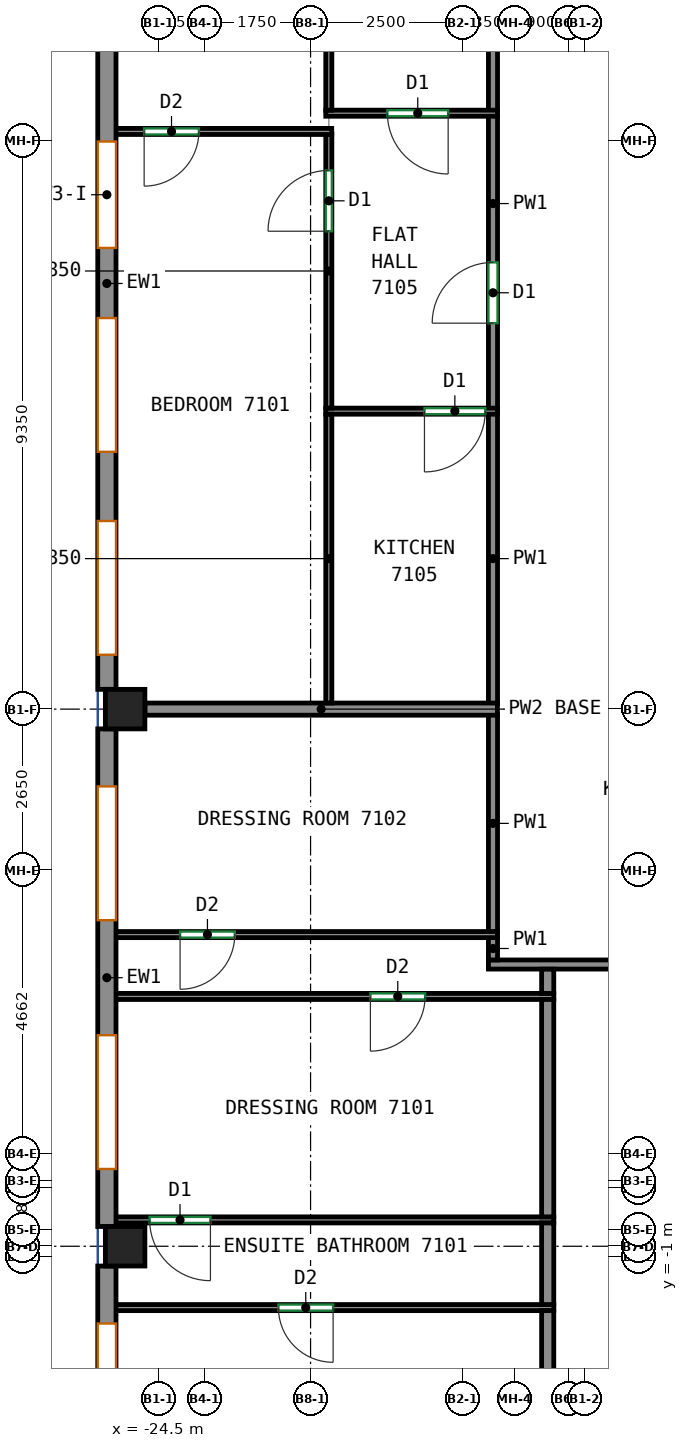
"""IFC4 building model, lengths in metres.
Left out: names, types, materials, properties, quantities, classifications, styles, units other than length and angle.
Written with IfcOpenShell. Run it as: python <this file> out.ifc"""

import sys

from ifc_helpers import new_model, si_unit, direction, frame, frame_2d, origin, origin_2d, place, context, subcontext, project, spatial, rectangle, extrude, source, transform, mapped, element, fill, save


model = new_model("IFC4")
c1 = context("Model", 3, precision=1e-05, world=origin(), true_north=direction((0.0, 1.0)))
c2 = subcontext(c1, "Body", "Model", "MODEL_VIEW")
j1 = project(units=[si_unit("LENGTHUNIT", "METRE"), si_unit("PLANEANGLEUNIT", "RADIAN")], contexts=[c1])
p1 = place(None, origin())
s1 = spatial("IfcSite", under=j1, at=p1, CompositionType="ELEMENT")
p2 = place(p1, origin())
s2 = spatial("IfcBuilding", under=s1, at=p2, CompositionType="ELEMENT")
p3 = place(p2, frame((0.0, 0.0, 287.4)))
s3 = spatial("IfcBuildingStorey", under=s2, at=p3, CompositionType="ELEMENT", Elevation=287.4)
m1 = source(origin(), c2, "Body", "SweptSolid", [
    extrude(rectangle(XDim=0.65, YDim=0.65, at=origin_2d()), origin(), (0.0, 0.0, 1.0), 3.0),
])
for number, where, z_axis, x_axis in (
    (1, (-25.05, -0.833, 0.0), (0.0, 0.0, 1.0), (1.0, 0.0, 0.0)),
    (2, (-25.05, 8.0, 0.0), (0.0, 0.0, 1.0), (1.0, 0.0, 0.0)),
):
    element("IfcColumn", number, at=place(p3, frame(where, z_axis=z_axis, x_axis=x_axis)), inside=s3, PredefinedType="COLUMN", context=c2, shape_type="MappedRepresentation", body=[
        mapped(m1, transform((0.0, 0.0, 0.0))),
    ])
m2 = source(origin(), c2, "Body", "SweptSolid", [
    extrude(rectangle(XDim=13.35, YDim=0.3, at=frame_2d((6.675, 0.0))), origin(), (0.0, 0.0, 1.0), 3.0),
])
p4 = place(p3, frame((-25.35, 21.675, 0.0), z_axis=(0.0, 0.0, 1.0), x_axis=(0.0, -1.0, 0.0)))
e3 = element("IfcWall", 3, at=p4, inside=s3, PredefinedType="SOLIDWALL", context=c2, shape_type="MappedRepresentation", body=[
    mapped(m2, transform((0.0, 0.0, 0.0))),
])
p5 = place(p4, frame((0.569, 0.0, 0.8)))
e4 = element("IfcOpeningElement", 4, at=p5, cuts=e3, PredefinedType="OPENING", context=c2, shape_type="SweptSolid", body=[
    extrude(rectangle(XDim=2.2, YDim=2.05, at=frame_2d((1.1, 1.025))), frame((0.0, 0.16, 0.0), z_axis=(0.0, -1.0, 0.0), x_axis=(1.0, 0.0, 0.0)), (0.0, 0.0, 1.0), 0.32),
])
p6 = place(p4, frame((4.341, 0.0, 0.8)))
e5 = element("IfcOpeningElement", 5, at=p6, cuts=e3, PredefinedType="OPENING", context=c2, shape_type="SweptSolid", body=[
    extrude(rectangle(XDim=1.75, YDim=2.05, at=frame_2d((0.875, 1.025))), frame((0.0, 0.16, 0.0), z_axis=(0.0, -1.0, 0.0), x_axis=(1.0, 0.0, 0.0)), (0.0, 0.0, 1.0), 0.32),
])
p7 = place(p4, frame((7.244, 0.0, 0.8)))
e6 = element("IfcOpeningElement", 6, at=p7, cuts=e3, PredefinedType="OPENING", context=c2, shape_type="SweptSolid", body=[
    extrude(rectangle(XDim=2.2, YDim=2.05, at=frame_2d((1.1, 1.025))), frame((0.0, 0.16, 0.0), z_axis=(0.0, -1.0, 0.0), x_axis=(1.0, 0.0, 0.0)), (0.0, 0.0, 1.0), 0.32),
])
p8 = place(p4, frame((10.581, 0.0, 0.8)))
e7 = element("IfcOpeningElement", 7, at=p8, cuts=e3, PredefinedType="OPENING", context=c2, shape_type="SweptSolid", body=[
    extrude(rectangle(XDim=2.2, YDim=2.05, at=frame_2d((1.1, 1.025))), frame((0.0, 0.16, 0.0), z_axis=(0.0, -1.0, 0.0), x_axis=(1.0, 0.0, 0.0)), (0.0, 0.0, 1.0), 0.32),
])
m3 = source(origin(), c2, "Body", "SweptSolid", [
    extrude(rectangle(XDim=8.183, YDim=0.3, at=frame_2d((4.092, 0.0))), origin(), (0.0, 0.0, 1.0), 3.0),
])
p9 = place(p3, frame((-25.35, 7.675, 0.0), z_axis=(0.0, 0.0, 1.0), x_axis=(0.0, -1.0, 0.0)))
e8 = element("IfcWall", 8, at=p9, inside=s3, PredefinedType="SOLIDWALL", context=c2, shape_type="MappedRepresentation", body=[
    mapped(m3, transform((0.0, 0.0, 0.0))),
])
p10 = place(p9, frame((0.946, 0.0, 0.8)))
e9 = element("IfcOpeningElement", 9, at=p10, cuts=e8, PredefinedType="OPENING", context=c2, shape_type="SweptSolid", body=[
    extrude(rectangle(XDim=2.2, YDim=2.05, at=frame_2d((1.1, 1.025))), frame((0.0, 0.16, 0.0), z_axis=(0.0, -1.0, 0.0), x_axis=(1.0, 0.0, 0.0)), (0.0, 0.0, 1.0), 0.32),
])
p11 = place(p9, frame((5.037, 0.0, 0.8)))
e10 = element("IfcOpeningElement", 10, at=p11, cuts=e8, PredefinedType="OPENING", context=c2, shape_type="SweptSolid", body=[
    extrude(rectangle(XDim=2.2, YDim=2.05, at=frame_2d((1.1, 1.025))), frame((0.0, 0.16, 0.0), z_axis=(0.0, -1.0, 0.0), x_axis=(1.0, 0.0, 0.0)), (0.0, 0.0, 1.0), 0.32),
])
m4 = source(origin(), c2, "Body", "SweptSolid", [
    extrude(rectangle(XDim=8.184, YDim=0.3, at=frame_2d((4.092, 0.0))), origin(), (0.0, 0.0, 1.0), 3.0),
])
p12 = place(p3, frame((-25.35, -1.158, 0.0), z_axis=(0.0, 0.0, 1.0), x_axis=(0.0, -1.0, 0.0)))
e11 = element("IfcWall", 11, at=p12, inside=s3, PredefinedType="SOLIDWALL", context=c2, shape_type="MappedRepresentation", body=[
    mapped(m4, transform((0.0, 0.0, 0.0))),
])
p13 = place(p12, frame((0.946, 0.0, 0.8)))
e12 = element("IfcOpeningElement", 12, at=p13, cuts=e11, PredefinedType="OPENING", context=c2, shape_type="SweptSolid", body=[
    extrude(rectangle(XDim=2.2, YDim=2.05, at=frame_2d((1.1, 1.025))), frame((0.0, 0.16, 0.0), z_axis=(0.0, -1.0, 0.0), x_axis=(1.0, 0.0, 0.0)), (0.0, 0.0, 1.0), 0.32),
])
p14 = place(p12, frame((5.038, 0.0, 0.8)))
e13 = element("IfcOpeningElement", 13, at=p14, cuts=e11, PredefinedType="OPENING", context=c2, shape_type="SweptSolid", body=[
    extrude(rectangle(XDim=2.2, YDim=2.05, at=frame_2d((1.1, 1.025))), frame((0.0, 0.16, 0.0), z_axis=(0.0, -1.0, 0.0), x_axis=(1.0, 0.0, 0.0)), (0.0, 0.0, 1.0), 0.32),
])
p15 = place(p3, frame((-19.075, 3.8, 0.0), z_axis=(0.0, 0.0, 1.0), x_axis=(1.0, 0.0, 0.0)))
e14 = element("IfcWall", 14, at=p15, inside=s3, PredefinedType="PARTITIONING", context=c2, shape_type="SweptSolid", body=[
    extrude(rectangle(XDim=4.89, YDim=0.15, at=frame_2d((2.445, 0.0))), origin(), (0.0, 0.0, 1.0), 3.0),
])
p16 = place(p3, frame((-19.0, 3.875, 0.0), z_axis=(0.0, 0.0, 1.0), x_axis=(0.0, 1.0, 0.0)))
e15 = element("IfcWall", 15, at=p16, inside=s3, PredefinedType="PARTITIONING", context=c2, shape_type="SweptSolid", body=[
    extrude(rectangle(XDim=0.377, YDim=0.15, at=frame_2d((0.188, 0.0))), origin(), (0.0, 0.0, 1.0), 3.0),
])
p17 = place(p3, frame((-19.0, 4.332, 0.0), z_axis=(0.0, 0.0, 1.0), x_axis=(0.0, 1.0, 0.0)))
e16 = element("IfcWall", 16, at=p17, inside=s3, PredefinedType="PARTITIONING", context=c2, shape_type="SweptSolid", body=[
    extrude(rectangle(XDim=3.578, YDim=0.15, at=frame_2d((1.789, 0.0))), origin(), (0.0, 0.0, 1.0), 3.0),
])
p18 = place(p3, frame((-19.0, 8.09, 0.0), z_axis=(0.0, 0.0, 1.0), x_axis=(0.0, 1.0, 0.0)))
e17 = element("IfcWall", 17, at=p18, inside=s3, PredefinedType="PARTITIONING", context=c2, shape_type="SweptSolid", body=[
    extrude(rectangle(XDim=4.77, YDim=0.15, at=frame_2d((2.385, 0.0))), origin(), (0.0, 0.0, 1.0), 3.0),
])
p19 = place(p3, frame((-19.0, 12.94, 0.0), z_axis=(0.0, 0.0, 1.0), x_axis=(0.0, 1.0, 0.0)))
e18 = element("IfcWall", 18, at=p19, inside=s3, PredefinedType="PARTITIONING", context=c2, shape_type="SweptSolid", body=[
    extrude(rectangle(XDim=4.82, YDim=0.15, at=frame_2d((2.41, 0.0))), origin(), (0.0, 0.0, 1.0), 3.0),
])
p20 = place(p19, frame((1.407, 0.0, 0.0)))
e19 = element("IfcOpeningElement", 19, at=p20, cuts=e18, PredefinedType="OPENING", context=c2, shape_type="SweptSolid", body=[
    extrude(rectangle(XDim=1.0, YDim=2.1, at=frame_2d((0.5, 1.05))), frame((0.0, 0.085, 0.0), z_axis=(0.0, -1.0, 0.0), x_axis=(1.0, 0.0, 0.0)), (0.0, 0.0, 1.0), 0.17),
])
p21 = place(p3, frame((-19.0, 17.84, 0.0), z_axis=(0.0, 0.0, 1.0), x_axis=(0.0, 1.0, 0.0)))
e20 = element("IfcWall", 20, at=p21, inside=s3, PredefinedType="PARTITIONING", context=c2, shape_type="SweptSolid", body=[
    extrude(rectangle(XDim=4.82, YDim=0.15, at=frame_2d((2.41, 0.0))), origin(), (0.0, 0.0, 1.0), 3.0),
])
p22 = place(p3, frame((-18.0, -1.842, 0.0), z_axis=(0.0, 0.0, 1.0), x_axis=(-1.0, 0.0, 0.0)))
e21 = element("IfcWall", 21, at=p22, inside=s3, PredefinedType="PARTITIONING", context=c2, shape_type="SweptSolid", body=[
    extrude(rectangle(XDim=7.25, YDim=0.1, at=frame_2d((3.625, 0.0))), origin(), (0.0, 0.0, 1.0), 3.0),
])
p23 = place(p22, frame((3.629, 0.0, 0.0)))
e22 = element("IfcOpeningElement", 22, at=p23, cuts=e21, PredefinedType="OPENING", context=c2, shape_type="SweptSolid", body=[
    extrude(rectangle(XDim=0.9, YDim=2.1, at=frame_2d((0.45, 1.05))), frame((0.0, 0.06, 0.0), z_axis=(0.0, -1.0, 0.0), x_axis=(1.0, 0.0, 0.0)), (0.0, 0.0, 1.0), 0.12),
])
p24 = place(p3, frame((-18.1, -5.823, 0.0), z_axis=(0.0, 0.0, 1.0), x_axis=(0.0, 1.0, 0.0)))
e23 = element("IfcWall", 23, at=p24, inside=s3, PredefinedType="PARTITIONING", context=c2, shape_type="SweptSolid", body=[
    extrude(rectangle(XDim=3.931, YDim=0.2, at=frame_2d((1.965, 0.0))), origin(), (0.0, 0.0, 1.0), 3.0),
])
p25 = place(p3, frame((-18.0, -0.4, 0.0), z_axis=(0.0, 0.0, 1.0), x_axis=(-1.0, 0.0, 0.0)))
e24 = element("IfcWall", 24, at=p25, inside=s3, PredefinedType="PARTITIONING", context=c2, shape_type="SweptSolid", body=[
    extrude(rectangle(XDim=7.25, YDim=0.1, at=frame_2d((3.625, 0.0))), origin(), (0.0, 0.0, 1.0), 3.0),
])
p26 = place(p25, frame((5.647, 0.0, 0.0)))
e25 = element("IfcOpeningElement", 25, at=p26, cuts=e24, PredefinedType="OPENING", context=c2, shape_type="SweptSolid", body=[
    extrude(rectangle(XDim=1.0, YDim=2.1, at=frame_2d((0.5, 1.05))), frame((0.0, 0.06, 0.0), z_axis=(0.0, -1.0, 0.0), x_axis=(1.0, 0.0, 0.0)), (0.0, 0.0, 1.0), 0.12),
])
p27 = place(p3, frame((-18.1, -1.792, 0.0), z_axis=(0.0, 0.0, 1.0), x_axis=(0.0, 1.0, 0.0)))
e26 = element("IfcWall", 26, at=p27, inside=s3, PredefinedType="PARTITIONING", context=c2, shape_type="SweptSolid", body=[
    extrude(rectangle(XDim=1.342, YDim=0.2, at=frame_2d((0.671, 0.0))), origin(), (0.0, 0.0, 1.0), 3.0),
])
p28 = place(p3, frame((-18.0, 3.275, 0.0), z_axis=(0.0, 0.0, 1.0), x_axis=(-1.0, 0.0, 0.0)))
e27 = element("IfcWall", 27, at=p28, inside=s3, PredefinedType="PARTITIONING", context=c2, shape_type="SweptSolid", body=[
    extrude(rectangle(XDim=7.25, YDim=0.1, at=frame_2d((3.625, 0.0))), origin(), (0.0, 0.0, 1.0), 3.0),
])
p29 = place(p28, frame((2.116, 0.0, 0.0)))
e28 = element("IfcOpeningElement", 28, at=p29, cuts=e27, PredefinedType="OPENING", context=c2, shape_type="SweptSolid", body=[
    extrude(rectangle(XDim=0.9, YDim=2.1, at=frame_2d((0.45, 1.05))), frame((0.0, 0.06, 0.0), z_axis=(0.0, -1.0, 0.0), x_axis=(1.0, 0.0, 0.0)), (0.0, 0.0, 1.0), 0.12),
])
p30 = place(p3, frame((-18.1, -0.35, 0.0), z_axis=(0.0, 0.0, 1.0), x_axis=(0.0, 1.0, 0.0)))
e29 = element("IfcWall", 29, at=p30, inside=s3, PredefinedType="PARTITIONING", context=c2, shape_type="SweptSolid", body=[
    extrude(rectangle(XDim=3.575, YDim=0.2, at=frame_2d((1.788, 0.0))), origin(), (0.0, 0.0, 1.0), 3.0),
])
p31 = place(p3, frame((-18.927, 4.292, 0.0), z_axis=(0.0, 0.0, 1.0), x_axis=(-1.0, 0.0, 0.0)))
e30 = element("IfcWall", 30, at=p31, inside=s3, PredefinedType="PARTITIONING", context=c2, shape_type="SweptSolid", body=[
    extrude(rectangle(XDim=6.323, YDim=0.1, at=frame_2d((3.162, 0.0))), origin(), (0.0, 0.0, 1.0), 3.0),
])
p32 = place(p31, frame((4.319, 0.0, 0.0)))
e31 = element("IfcOpeningElement", 31, at=p32, cuts=e30, PredefinedType="OPENING", context=c2, shape_type="SweptSolid", body=[
    extrude(rectangle(XDim=0.9, YDim=2.1, at=frame_2d((0.45, 1.05))), frame((0.0, 0.06, 0.0), z_axis=(0.0, -1.0, 0.0), x_axis=(1.0, 0.0, 0.0)), (0.0, 0.0, 1.0), 0.12),
])
p33 = place(p3, frame((-18.1, 3.325, 0.0), z_axis=(0.0, 0.0, 1.0), x_axis=(0.0, 1.0, 0.0)))
e32 = element("IfcWall", 32, at=p33, inside=s3, PredefinedType="PARTITIONING", context=c2, shape_type="SweptSolid", body=[
    extrude(rectangle(XDim=0.398, YDim=0.2, at=frame_2d((0.199, 0.0))), origin(), (0.0, 0.0, 1.0), 3.0),
])
p34 = place(p3, frame((-24.725, 8.0, 0.0), z_axis=(0.0, 0.0, 1.0), x_axis=(1.0, 0.0, 0.0)))
e33 = element("IfcWall", 33, at=p34, inside=s3, PredefinedType="PARTITIONING", context=c2, shape_type="SweptSolid", body=[
    extrude(rectangle(XDim=5.798, YDim=0.2, at=frame_2d((2.899, 0.0))), origin(), (0.0, 0.0, 1.0), 2.45),
])
p35 = place(p3, frame((-18.927, 12.9, 0.0), z_axis=(0.0, 0.0, 1.0), x_axis=(-1.0, 0.0, 0.0)))
e34 = element("IfcWall", 34, at=p35, inside=s3, PredefinedType="PARTITIONING", context=c2, shape_type="SweptSolid", body=[
    extrude(rectangle(XDim=2.823, YDim=0.1, at=frame_2d((1.412, 0.0))), origin(), (0.0, 0.0, 1.0), 3.0),
])
p36 = place(p35, frame((0.2, 0.0, 0.0)))
e35 = element("IfcOpeningElement", 35, at=p36, cuts=e34, PredefinedType="OPENING", context=c2, shape_type="SweptSolid", body=[
    extrude(rectangle(XDim=1.0, YDim=2.1, at=frame_2d((0.5, 1.05))), frame((0.0, 0.06, 0.0), z_axis=(0.0, -1.0, 0.0), x_axis=(1.0, 0.0, 0.0)), (0.0, 0.0, 1.0), 0.12),
])
p37 = place(p3, frame((-21.7, 8.1, 0.0), z_axis=(0.0, 0.0, 1.0), x_axis=(0.0, 1.0, 0.0)))
e36 = element("IfcWall", 36, at=p37, inside=s3, PredefinedType="PARTITIONING", context=c2, shape_type="SweptSolid", body=[
    extrude(rectangle(XDim=4.75, YDim=0.1, at=frame_2d((2.375, 0.0))), origin(), (0.0, 0.0, 1.0), 2.45),
])
p38 = place(p3, frame((-18.927, 17.8, 0.0), z_axis=(0.0, 0.0, 1.0), x_axis=(-1.0, 0.0, 0.0)))
e37 = element("IfcWall", 37, at=p38, inside=s3, PredefinedType="PARTITIONING", context=c2, shape_type="SweptSolid", body=[
    extrude(rectangle(XDim=2.823, YDim=0.1, at=frame_2d((1.412, 0.0))), origin(), (0.0, 0.0, 1.0), 3.0),
])
p39 = place(p38, frame((0.81, 0.0, 0.0)))
e38 = element("IfcOpeningElement", 38, at=p39, cuts=e37, PredefinedType="OPENING", context=c2, shape_type="SweptSolid", body=[
    extrude(rectangle(XDim=1.0, YDim=2.1, at=frame_2d((0.5, 1.05))), frame((0.0, 0.06, 0.0), z_axis=(0.0, -1.0, 0.0), x_axis=(1.0, 0.0, 0.0)), (0.0, 0.0, 1.0), 0.12),
])
p40 = place(p3, frame((-21.7, 12.95, 0.0), z_axis=(0.0, 0.0, 1.0), x_axis=(0.0, 1.0, 0.0)))
e39 = element("IfcWall", 39, at=p40, inside=s3, PredefinedType="PARTITIONING", context=c2, shape_type="SweptSolid", body=[
    extrude(rectangle(XDim=4.51, YDim=0.1, at=frame_2d((2.255, 0.0))), origin(), (0.0, 0.0, 1.0), 2.45),
])
p41 = place(p40, frame((2.909, 0.0, 0.0)))
e40 = element("IfcOpeningElement", 40, at=p41, cuts=e39, PredefinedType="OPENING", context=c2, shape_type="SweptSolid", body=[
    extrude(rectangle(XDim=1.0, YDim=2.1, at=frame_2d((0.5, 1.05))), frame((0.0, 0.06, 0.0), z_axis=(0.0, -1.0, 0.0), x_axis=(1.0, 0.0, 0.0)), (0.0, 0.0, 1.0), 0.12),
])
p42 = place(p3, frame((-21.7, 17.85, 0.0), z_axis=(0.0, 0.0, 1.0), x_axis=(0.0, 1.0, 0.0)))
e41 = element("IfcWall", 41, at=p42, inside=s3, PredefinedType="PARTITIONING", context=c2, shape_type="SweptSolid", body=[
    extrude(rectangle(XDim=4.8, YDim=0.1, at=frame_2d((2.4, 0.0))), origin(), (0.0, 0.0, 1.0), 2.45),
])
p43 = place(p3, frame((-21.652, 17.5, 0.0), z_axis=(0.0, 0.0, 1.0), x_axis=(-1.0, 0.0, 0.0)))
e42 = element("IfcWall", 42, at=p43, inside=s3, PredefinedType="PARTITIONING", context=c2, shape_type="SweptSolid", body=[
    extrude(rectangle(XDim=3.598, YDim=0.1, at=frame_2d((1.799, 0.0))), origin(), (0.0, 0.0, 1.0), 3.0),
])
p44 = place(p43, frame((2.185, 0.0, 0.0)))
e43 = element("IfcOpeningElement", 43, at=p44, cuts=e42, PredefinedType="OPENING", context=c2, shape_type="SweptSolid", body=[
    extrude(rectangle(XDim=0.9, YDim=2.1, at=frame_2d((0.45, 1.05))), frame((0.0, 0.06, 0.0), z_axis=(0.0, -1.0, 0.0), x_axis=(1.0, 0.0, 0.0)), (0.0, 0.0, 1.0), 0.12),
])
p45 = place(p6, origin())
e44 = element("IfcWindow", 44, at=p45, inside=s3, PartitioningType="SINGLE_PANEL", PredefinedType="WINDOW", context=c2, shape_type="SweptSolid", body=[
    extrude(rectangle(XDim=1.75, YDim=2.05, at=frame_2d((0.875, 1.025))), frame((0.0, 0.03, 0.0), z_axis=(0.0, -1.0, 0.0), x_axis=(1.0, 0.0, 0.0)), (0.0, 0.0, 1.0), 0.06),
])
fill(e5, e44)
p46 = place(p7, origin())
e45 = element("IfcWindow", 45, at=p46, inside=s3, PartitioningType="SINGLE_PANEL", PredefinedType="WINDOW", context=c2, shape_type="SweptSolid", body=[
    extrude(rectangle(XDim=2.2, YDim=2.05, at=frame_2d((1.1, 1.025))), frame((0.0, 0.03, 0.0), z_axis=(0.0, -1.0, 0.0), x_axis=(1.0, 0.0, 0.0)), (0.0, 0.0, 1.0), 0.06),
])
fill(e6, e45)
p47 = place(p8, origin())
e46 = element("IfcWindow", 46, at=p47, inside=s3, PartitioningType="SINGLE_PANEL", PredefinedType="WINDOW", context=c2, shape_type="SweptSolid", body=[
    extrude(rectangle(XDim=2.2, YDim=2.05, at=frame_2d((1.1, 1.025))), frame((0.0, 0.03, 0.0), z_axis=(0.0, -1.0, 0.0), x_axis=(1.0, 0.0, 0.0)), (0.0, 0.0, 1.0), 0.06),
])
fill(e7, e46)
p48 = place(p10, origin())
e47 = element("IfcWindow", 47, at=p48, inside=s3, PartitioningType="SINGLE_PANEL", PredefinedType="WINDOW", context=c2, shape_type="SweptSolid", body=[
    extrude(rectangle(XDim=2.2, YDim=2.05, at=frame_2d((1.1, 1.025))), frame((0.0, 0.03, 0.0), z_axis=(0.0, -1.0, 0.0), x_axis=(1.0, 0.0, 0.0)), (0.0, 0.0, 1.0), 0.06),
])
fill(e9, e47)
p49 = place(p11, origin())
e48 = element("IfcWindow", 48, at=p49, inside=s3, PartitioningType="SINGLE_PANEL", PredefinedType="WINDOW", context=c2, shape_type="SweptSolid", body=[
    extrude(rectangle(XDim=2.2, YDim=2.05, at=frame_2d((1.1, 1.025))), frame((0.0, 0.03, 0.0), z_axis=(0.0, -1.0, 0.0), x_axis=(1.0, 0.0, 0.0)), (0.0, 0.0, 1.0), 0.06),
])
fill(e10, e48)
p50 = place(p13, origin())
e49 = element("IfcWindow", 49, at=p50, inside=s3, PartitioningType="SINGLE_PANEL", PredefinedType="WINDOW", context=c2, shape_type="SweptSolid", body=[
    extrude(rectangle(XDim=2.2, YDim=2.05, at=frame_2d((1.1, 1.025))), frame((0.0, 0.03, 0.0), z_axis=(0.0, -1.0, 0.0), x_axis=(1.0, 0.0, 0.0)), (0.0, 0.0, 1.0), 0.06),
])
fill(e12, e49)
p51 = place(p23, origin())
e50 = element("IfcDoor", 50, at=p51, inside=s3, OperationType="SINGLE_SWING_LEFT", PredefinedType="DOOR", context=c2, shape_type="SweptSolid", body=[
    extrude(rectangle(XDim=0.9, YDim=2.1, at=frame_2d((0.45, 1.05))), frame((0.0, 0.025, 0.0), z_axis=(0.0, -1.0, 0.0), x_axis=(1.0, 0.0, 0.0)), (0.0, 0.0, 1.0), 0.05),
])
fill(e22, e50)
p52 = place(p26, origin())
e51 = element("IfcDoor", 51, at=p52, inside=s3, OperationType="SINGLE_SWING_LEFT", PredefinedType="DOOR", context=c2, shape_type="SweptSolid", body=[
    extrude(rectangle(XDim=1.0, YDim=2.1, at=frame_2d((0.5, 1.05))), frame((0.0, 0.025, 0.0), z_axis=(0.0, -1.0, 0.0), x_axis=(1.0, 0.0, 0.0)), (0.0, 0.0, 1.0), 0.05),
])
fill(e25, e51)
p53 = place(p29, origin())
e52 = element("IfcDoor", 52, at=p53, inside=s3, OperationType="SINGLE_SWING_RIGHT", PredefinedType="DOOR", context=c2, shape_type="SweptSolid", body=[
    extrude(rectangle(XDim=0.9, YDim=2.1, at=frame_2d((0.45, 1.05))), frame((0.0, 0.025, 0.0), z_axis=(0.0, -1.0, 0.0), x_axis=(1.0, 0.0, 0.0)), (0.0, 0.0, 1.0), 0.05),
])
fill(e28, e52)
p54 = place(p32, origin())
e53 = element("IfcDoor", 53, at=p54, inside=s3, OperationType="SINGLE_SWING_RIGHT", PredefinedType="DOOR", context=c2, shape_type="SweptSolid", body=[
    extrude(rectangle(XDim=0.9, YDim=2.1, at=frame_2d((0.45, 1.05))), frame((0.0, 0.025, 0.0), z_axis=(0.0, -1.0, 0.0), x_axis=(1.0, 0.0, 0.0)), (0.0, 0.0, 1.0), 0.05),
])
fill(e31, e53)
p55 = place(p36, origin())
e54 = element("IfcDoor", 54, at=p55, inside=s3, OperationType="SINGLE_SWING_RIGHT", PredefinedType="DOOR", context=c2, shape_type="SweptSolid", body=[
    extrude(rectangle(XDim=1.0, YDim=2.1, at=frame_2d((0.5, 1.05))), frame((0.0, 0.025, 0.0), z_axis=(0.0, -1.0, 0.0), x_axis=(1.0, 0.0, 0.0)), (0.0, 0.0, 1.0), 0.05),
])
fill(e35, e54)
p56 = place(p20, origin())
e55 = element("IfcDoor", 55, at=p56, inside=s3, OperationType="SINGLE_SWING_LEFT", PredefinedType="DOOR", context=c2, shape_type="SweptSolid", body=[
    extrude(rectangle(XDim=1.0, YDim=2.1, at=frame_2d((0.5, 1.05))), frame((0.0, 0.025, 0.0), z_axis=(0.0, -1.0, 0.0), x_axis=(1.0, 0.0, 0.0)), (0.0, 0.0, 1.0), 0.05),
])
fill(e19, e55)
p57 = place(p41, origin())
e56 = element("IfcDoor", 56, at=p57, inside=s3, OperationType="SINGLE_SWING_LEFT", PredefinedType="DOOR", context=c2, shape_type="SweptSolid", body=[
    extrude(rectangle(XDim=1.0, YDim=2.1, at=frame_2d((0.5, 1.05))), frame((0.0, 0.025, 0.0), z_axis=(0.0, -1.0, 0.0), x_axis=(1.0, 0.0, 0.0)), (0.0, 0.0, 1.0), 0.05),
])
fill(e40, e56)
p58 = place(p44, origin())
e57 = element("IfcDoor", 57, at=p58, inside=s3, OperationType="SINGLE_SWING_RIGHT", PredefinedType="DOOR", context=c2, shape_type="SweptSolid", body=[
    extrude(rectangle(XDim=0.9, YDim=2.1, at=frame_2d((0.45, 1.05))), frame((0.0, 0.025, 0.0), z_axis=(0.0, -1.0, 0.0), x_axis=(1.0, 0.0, 0.0)), (0.0, 0.0, 1.0), 0.05),
])
fill(e43, e57)
p59 = place(p39, origin())
e58 = element("IfcDoor", 58, at=p59, inside=s3, OperationType="SINGLE_SWING_LEFT", PredefinedType="DOOR", context=c2, shape_type="SweptSolid", body=[
    extrude(rectangle(XDim=1.0, YDim=2.1, at=frame_2d((0.5, 1.05))), frame((0.0, 0.025, 0.0), z_axis=(0.0, -1.0, 0.0), x_axis=(1.0, 0.0, 0.0)), (0.0, 0.0, 1.0), 0.05),
])
fill(e38, e58)
save(model, sys.argv[1])
